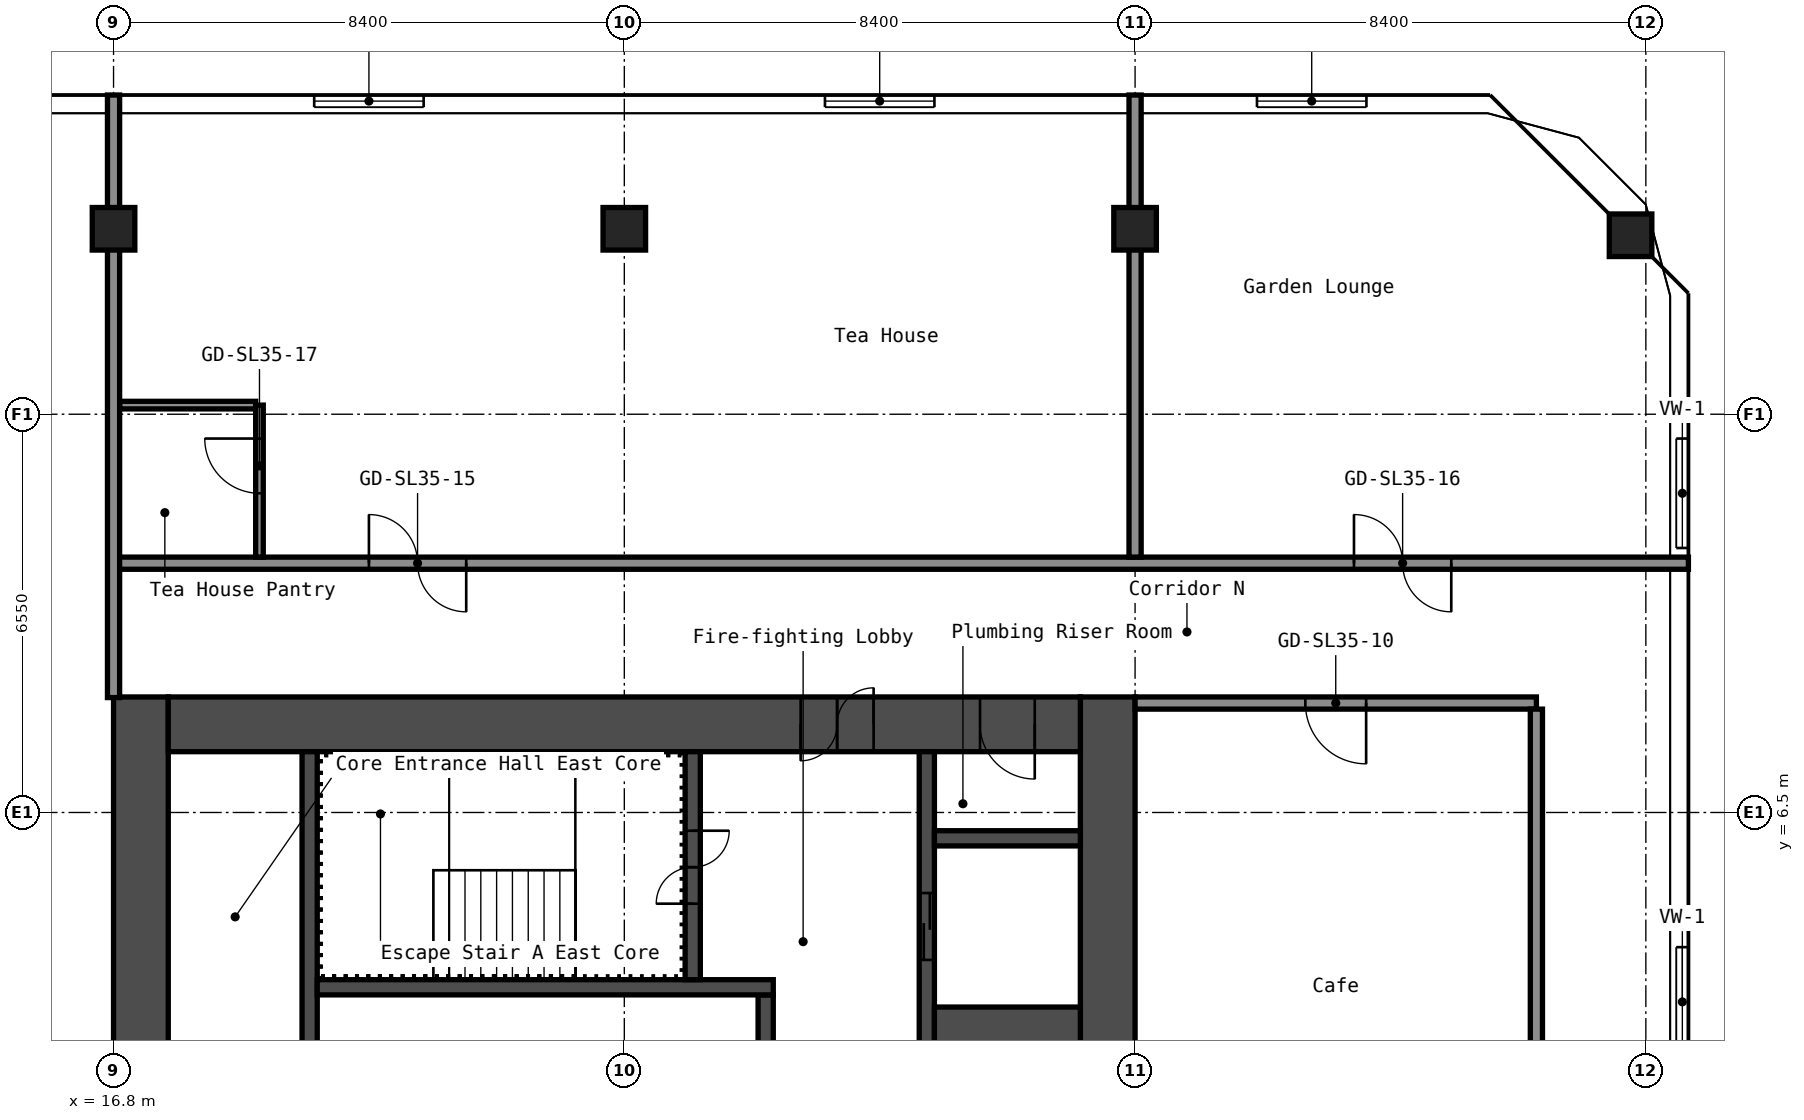
"""IFC4 building model, lengths in metres.
Left out: names, types, materials, properties, quantities, classifications, styles, units other than length and angle.
Written with IfcOpenShell. Run it as: python <this file> out.ifc"""

import sys

from ifc_helpers import new_model, si_unit, direction, frame, frame_2d, origin, origin_2d, place, context, subcontext, project, spatial, rectangle, hollow_rectangle, extrude, element, fill, save


model = new_model("IFC4")
c1 = context("Model", 3, precision=1e-05, world=origin(), true_north=direction((0.0, 1.0)))
c2 = subcontext(c1, "Body", "Model", "MODEL_VIEW")
j1 = project(units=[si_unit("LENGTHUNIT", "METRE"), si_unit("PLANEANGLEUNIT", "RADIAN")], contexts=[c1])
p1 = place(None, origin())
s1 = spatial("IfcSite", under=j1, at=p1, CompositionType="ELEMENT")
p2 = place(p1, origin())
s2 = spatial("IfcBuilding", under=s1, at=p2, CompositionType="ELEMENT")
p3 = place(p2, frame((0.0, 0.0, 124.6)))
s3 = spatial("IfcBuildingStorey", under=s2, at=p3, CompositionType="ELEMENT", Elevation=124.6)
for number, where, z_axis, x_axis in (
    (1, (16.8, 16.1, 0.0), (0.0, 0.0, 1.0), (1.0, 0.0, 0.0)),
    (2, (25.2, 16.1, 0.0), (0.0, 0.0, 1.0), (1.0, 0.0, 0.0)),
    (3, (33.6, 16.1, 0.0), (0.0, 0.0, 1.0), (1.0, 0.0, 0.0)),
    (4, (41.749, 15.994, 0.0), (0.0, 0.0, 1.0), (1.0, 0.0, 0.0)),
):
    element("IfcColumn", number, at=place(p3, frame(where, z_axis=z_axis, x_axis=x_axis)), inside=s3, PredefinedType="COLUMN", context=c2, shape_type="SweptSolid", body=[
        extrude(hollow_rectangle(XDim=0.7, YDim=0.7, WallThickness=0.028, at=origin_2d()), origin(), (0.0, 0.0, 1.0), 5.95),
    ])
p4 = place(p3, frame((17.25, -8.4, 0.0), z_axis=(0.0, 0.0, 1.0), x_axis=(0.0, 1.0, 0.0)))
e5 = element("IfcWall", 5, at=p4, inside=s3, PredefinedType="SHEAR", context=c2, shape_type="SweptSolid", body=[
    extrude(rectangle(XDim=16.8, YDim=0.9, at=frame_2d((8.4, 0.0))), origin(), (0.0, 0.0, 1.0), 5.95),
])
p5 = place(p4, frame((7.1, 0.0, 0.0)))
e6 = element("IfcOpeningElement", 6, at=p5, cuts=e5, PredefinedType="OPENING", context=c2, shape_type="SweptSolid", body=[
    extrude(rectangle(XDim=1.6, YDim=2.1, at=frame_2d((0.8, 1.05))), frame((0.0, 0.46, 0.0), z_axis=(0.0, -1.0, 0.0), x_axis=(1.0, 0.0, 0.0)), (0.0, 0.0, 1.0), 0.92),
])
p6 = place(p3, frame((33.15, -8.4, 0.0), z_axis=(0.0, 0.0, 1.0), x_axis=(0.0, 1.0, 0.0)))
e7 = element("IfcWall", 7, at=p6, inside=s3, PredefinedType="SHEAR", context=c2, shape_type="SweptSolid", body=[
    extrude(rectangle(XDim=16.8, YDim=0.9, at=frame_2d((8.4, 0.0))), origin(), (0.0, 0.0, 1.0), 5.95),
])
p7 = place(p3, frame((17.7, 7.95, 0.0), z_axis=(0.0, 0.0, 1.0), x_axis=(1.0, 0.0, 0.0)))
e8 = element("IfcWall", 8, at=p7, inside=s3, PredefinedType="SHEAR", context=c2, shape_type="SweptSolid", body=[
    extrude(rectangle(XDim=15.0, YDim=0.9, at=frame_2d((7.5, 0.0))), origin(), (0.0, 0.0, 1.0), 5.95),
])
p8 = place(p7, frame((10.4, 0.0, 0.0)))
e9 = element("IfcOpeningElement", 9, at=p8, cuts=e8, PredefinedType="OPENING", context=c2, shape_type="SweptSolid", body=[
    extrude(rectangle(XDim=1.2, YDim=2.1, at=frame_2d((0.6, 1.05))), frame((0.0, 0.46, 0.0), z_axis=(0.0, -1.0, 0.0), x_axis=(1.0, 0.0, 0.0)), (0.0, 0.0, 1.0), 0.92),
])
p9 = place(p7, frame((13.35, 0.0, 0.0)))
e10 = element("IfcOpeningElement", 10, at=p9, cuts=e8, PredefinedType="OPENING", context=c2, shape_type="SweptSolid", body=[
    extrude(rectangle(XDim=0.9, YDim=2.1, at=frame_2d((0.45, 1.05))), frame((0.0, 0.46, 0.0), z_axis=(0.0, -1.0, 0.0), x_axis=(1.0, 0.0, 0.0)), (0.0, 0.0, 1.0), 0.92),
])
p10 = place(p3, frame((20.025, 1.2, 0.0), z_axis=(0.0, 0.0, 1.0), x_axis=(0.0, 1.0, 0.0)))
e11 = element("IfcWall", 11, at=p10, inside=s3, PredefinedType="SHEAR", context=c2, shape_type="SweptSolid", body=[
    extrude(rectangle(XDim=6.3, YDim=0.25, at=frame_2d((3.15, 0.0))), origin(), (0.0, 0.0, 1.0), 5.95),
])
p11 = place(p3, frame((27.525, 1.45, 0.0), z_axis=(0.0, 0.0, 1.0), x_axis=(0.0, 1.0, 0.0)))
e12 = element("IfcWall", 12, at=p11, inside=s3, PredefinedType="SHEAR", context=c2, shape_type="SweptSolid", body=[
    extrude(rectangle(XDim=2.05, YDim=0.25, at=frame_2d((1.025, 0.0))), origin(), (0.0, 0.0, 1.0), 5.95),
])
p12 = place(p3, frame((20.15, 3.625, 0.0), z_axis=(0.0, 0.0, 1.0), x_axis=(1.0, 0.0, 0.0)))
e13 = element("IfcWall", 13, at=p12, inside=s3, PredefinedType="SHEAR", context=c2, shape_type="SweptSolid", body=[
    extrude(rectangle(XDim=7.5, YDim=0.25, at=frame_2d((3.75, 0.0))), origin(), (0.0, 0.0, 1.0), 5.95),
])
p13 = place(p3, frame((26.325, 3.75, 0.0), z_axis=(0.0, 0.0, 1.0), x_axis=(0.0, 1.0, 0.0)))
e14 = element("IfcWall", 14, at=p13, inside=s3, PredefinedType="SHEAR", context=c2, shape_type="SweptSolid", body=[
    extrude(rectangle(XDim=3.75, YDim=0.25, at=frame_2d((1.875, 0.0))), origin(), (0.0, 0.0, 1.0), 5.95),
])
p14 = place(p13, frame((1.25, 0.0, 0.0)))
e15 = element("IfcOpeningElement", 15, at=p14, cuts=e14, PredefinedType="OPENING", context=c2, shape_type="SweptSolid", body=[
    extrude(rectangle(XDim=1.2, YDim=2.1, at=frame_2d((0.6, 1.05))), frame((0.0, 0.135, 0.0), z_axis=(0.0, -1.0, 0.0), x_axis=(1.0, 0.0, 0.0)), (0.0, 0.0, 1.0), 0.27),
])
p15 = place(p3, frame((30.175, 1.45, 0.0), z_axis=(0.0, 0.0, 1.0), x_axis=(0.0, 1.0, 0.0)))
e16 = element("IfcWall", 16, at=p15, inside=s3, PredefinedType="SHEAR", context=c2, shape_type="SweptSolid", body=[
    extrude(rectangle(XDim=6.05, YDim=0.25, at=frame_2d((3.025, 0.0))), origin(), (0.0, 0.0, 1.0), 5.95),
])
p16 = place(p15, frame((2.625, 0.0, 0.0)))
e17 = element("IfcOpeningElement", 17, at=p16, cuts=e16, PredefinedType="OPENING", context=c2, shape_type="SweptSolid", body=[
    extrude(rectangle(XDim=1.1, YDim=2.1, at=frame_2d((0.55, 1.05))), frame((0.0, 0.135, 0.0), z_axis=(0.0, -1.0, 0.0), x_axis=(1.0, 0.0, 0.0)), (0.0, 0.0, 1.0), 0.27),
])
p17 = place(p3, frame((30.3, 2.375, 0.0), z_axis=(0.0, 0.0, 1.0), x_axis=(1.0, 0.0, 0.0)))
e18 = element("IfcWall", 18, at=p17, inside=s3, PredefinedType="SHEAR", context=c2, shape_type="SweptSolid", body=[
    extrude(rectangle(XDim=2.4, YDim=1.85, at=frame_2d((1.2, 0.0))), origin(), (0.0, 0.0, 1.0), 5.95),
])
p18 = place(p3, frame((30.3, 6.075, 0.0), z_axis=(0.0, 0.0, 1.0), x_axis=(1.0, 0.0, 0.0)))
e19 = element("IfcWall", 19, at=p18, inside=s3, PredefinedType="SHEAR", context=c2, shape_type="SweptSolid", body=[
    extrude(rectangle(XDim=2.4, YDim=0.25, at=frame_2d((1.2, 0.0))), origin(), (0.0, 0.0, 1.0), 5.95),
])
p19 = place(p3, frame((33.6, 8.3, 0.0), z_axis=(0.0, 0.0, 1.0), x_axis=(1.0, 0.0, 0.0)))
e20 = element("IfcWall", 20, at=p19, inside=s3, PredefinedType="PARTITIONING", context=c2, shape_type="SweptSolid", body=[
    extrude(rectangle(XDim=6.6, YDim=0.2, at=frame_2d((3.3, 0.0))), origin(), (0.0, 0.0, 1.0), 5.95),
])
p20 = place(p19, frame((2.8, 0.0, 0.0)))
e21 = element("IfcOpeningElement", 21, at=p20, cuts=e20, PredefinedType="OPENING", context=c2, shape_type="SweptSolid", body=[
    extrude(rectangle(XDim=1.0, YDim=2.1, at=frame_2d((0.5, 1.05))), frame((0.0, 0.11, 0.0), z_axis=(0.0, -1.0, 0.0), x_axis=(1.0, 0.0, 0.0)), (0.0, 0.0, 1.0), 0.22),
])
p21 = place(p3, frame((16.8, 10.6, 0.0), z_axis=(0.0, 0.0, 1.0), x_axis=(1.0, 0.0, 0.0)))
e22 = element("IfcWall", 22, at=p21, inside=s3, PredefinedType="PARTITIONING", context=c2, shape_type="SweptSolid", body=[
    extrude(rectangle(XDim=25.9, YDim=0.2, at=frame_2d((12.95, 0.0))), origin(), (0.0, 0.0, 1.0), 5.95),
])
p22 = place(p21, frame((4.2, 0.0, 0.0)))
e23 = element("IfcOpeningElement", 23, at=p22, cuts=e22, PredefinedType="OPENING", context=c2, shape_type="SweptSolid", body=[
    extrude(rectangle(XDim=1.6, YDim=2.1, at=frame_2d((0.8, 1.05))), frame((0.0, 0.11, 0.0), z_axis=(0.0, -1.0, 0.0), x_axis=(1.0, 0.0, 0.0)), (0.0, 0.0, 1.0), 0.22),
])
p23 = place(p21, frame((20.4, 0.0, 0.0)))
e24 = element("IfcOpeningElement", 24, at=p23, cuts=e22, PredefinedType="OPENING", context=c2, shape_type="SweptSolid", body=[
    extrude(rectangle(XDim=1.6, YDim=2.1, at=frame_2d((0.8, 1.05))), frame((0.0, 0.11, 0.0), z_axis=(0.0, -1.0, 0.0), x_axis=(1.0, 0.0, 0.0)), (0.0, 0.0, 1.0), 0.22),
])
p24 = place(p3, frame((16.9, 13.2, 0.0), z_axis=(0.0, 0.0, 1.0), x_axis=(1.0, 0.0, 0.0)))
e25 = element("IfcWall", 25, at=p24, inside=s3, PredefinedType="PARTITIONING", context=c2, shape_type="SweptSolid", body=[
    extrude(rectangle(XDim=2.238, YDim=0.125, at=frame_2d((1.119, 0.0))), origin(), (0.0, 0.0, 1.0), 5.95),
])
p25 = place(p3, frame((16.8, 8.39, 0.0), z_axis=(0.0, 0.0, 1.0), x_axis=(0.0, 1.0, 0.0)))
e26 = element("IfcWall", 26, at=p25, inside=s3, PredefinedType="PARTITIONING", context=c2, shape_type="SweptSolid", body=[
    extrude(rectangle(XDim=9.91, YDim=0.2, at=frame_2d((4.955, 0.0))), origin(), (0.0, 0.0, 1.0), 5.95),
])
p26 = place(p3, frame((19.2, 10.7, 0.0), z_axis=(0.0, 0.0, 1.0), x_axis=(0.0, 1.0, 0.0)))
e27 = element("IfcWall", 27, at=p26, inside=s3, PredefinedType="PARTITIONING", context=c2, shape_type="SweptSolid", body=[
    extrude(rectangle(XDim=2.5, YDim=0.125, at=frame_2d((1.25, 0.0))), origin(), (0.0, 0.0, 1.0), 5.95),
])
p27 = place(p26, frame((1.05, 0.0, 0.0)))
e28 = element("IfcOpeningElement", 28, at=p27, cuts=e27, PredefinedType="OPENING", context=c2, shape_type="SweptSolid", body=[
    extrude(rectangle(XDim=0.9, YDim=2.1, at=frame_2d((0.45, 1.05))), frame((0.0, 0.073, 0.0), z_axis=(0.0, -1.0, 0.0), x_axis=(1.0, 0.0, 0.0)), (0.0, 0.0, 1.0), 0.145),
])
p28 = place(p3, frame((33.6, 10.7, 0.0), z_axis=(0.0, 0.0, 1.0), x_axis=(0.0, 1.0, 0.0)))
e29 = element("IfcWall", 29, at=p28, inside=s3, PredefinedType="PARTITIONING", context=c2, shape_type="SweptSolid", body=[
    extrude(rectangle(XDim=7.6, YDim=0.2, at=frame_2d((3.8, 0.0))), origin(), (0.0, 0.0, 1.0), 5.95),
])
p29 = place(p3, frame((40.2, -8.2, 0.0), z_axis=(0.0, 0.0, 1.0), x_axis=(0.0, 1.0, 0.0)))
e30 = element("IfcWall", 30, at=p29, inside=s3, PredefinedType="PARTITIONING", context=c2, shape_type="SweptSolid", body=[
    extrude(rectangle(XDim=16.4, YDim=0.2, at=frame_2d((8.2, 0.0))), origin(), (0.0, 0.0, 1.0), 5.95),
])
p30 = place(p3, frame((42.6, -0.5, 4.45), z_axis=(0.0, 0.0, 1.0), x_axis=(0.0, 1.0, 0.0)))
p31 = place(p30, frame((2.985, 0.0, 0.25)))
p32 = place(p31, origin())
e31 = element("IfcWindow", 31, at=p32, inside=s3, PartitioningType="SINGLE_PANEL", PredefinedType="WINDOW", context=c2, shape_type="SweptSolid", body=[
    extrude(rectangle(XDim=1.8, YDim=0.9, at=frame_2d((0.9, 0.45))), frame((0.0, 0.03, 0.0), z_axis=(0.0, -1.0, 0.0), x_axis=(1.0, 0.0, 0.0)), (0.0, 0.0, 1.0), 0.06),
])
p33 = place(p3, frame((42.6, 7.27, 4.45), z_axis=(0.0, 0.0, 1.0), x_axis=(0.0, 1.0, 0.0)))
p34 = place(p33, frame((3.58, 0.0, 0.25)))
p35 = place(p34, origin())
e32 = element("IfcWindow", 32, at=p35, inside=s3, PartitioningType="SINGLE_PANEL", PredefinedType="WINDOW", context=c2, shape_type="SweptSolid", body=[
    extrude(rectangle(XDim=1.8, YDim=0.9, at=frame_2d((0.9, 0.45))), frame((0.0, 0.03, 0.0), z_axis=(0.0, -1.0, 0.0), x_axis=(1.0, 0.0, 0.0)), (0.0, 0.0, 1.0), 0.06),
])
p36 = place(p3, frame((39.409, 18.2, 4.45), z_axis=(0.0, 0.0, 1.0), x_axis=(-1.0, 0.0, 0.0)))
p37 = place(p36, frame((2.005, 0.0, 0.25)))
p38 = place(p37, origin())
e33 = element("IfcWindow", 33, at=p38, inside=s3, PartitioningType="SINGLE_PANEL", PredefinedType="WINDOW", context=c2, shape_type="SweptSolid", body=[
    extrude(rectangle(XDim=1.8, YDim=0.9, at=frame_2d((0.9, 0.45))), frame((0.0, 0.03, 0.0), z_axis=(0.0, -1.0, 0.0), x_axis=(1.0, 0.0, 0.0)), (0.0, 0.0, 1.0), 0.06),
])
p39 = place(p3, frame((33.6, 18.2, 4.45), z_axis=(0.0, 0.0, 1.0), x_axis=(-1.0, 0.0, 0.0)))
p40 = place(p39, frame((3.3, 0.0, 0.25)))
p41 = place(p40, origin())
e34 = element("IfcWindow", 34, at=p41, inside=s3, PartitioningType="SINGLE_PANEL", PredefinedType="WINDOW", context=c2, shape_type="SweptSolid", body=[
    extrude(rectangle(XDim=1.8, YDim=0.9, at=frame_2d((0.9, 0.45))), frame((0.0, 0.03, 0.0), z_axis=(0.0, -1.0, 0.0), x_axis=(1.0, 0.0, 0.0)), (0.0, 0.0, 1.0), 0.06),
])
p42 = place(p3, frame((25.2, 18.2, 4.45), z_axis=(0.0, 0.0, 1.0), x_axis=(-1.0, 0.0, 0.0)))
p43 = place(p42, frame((3.3, 0.0, 0.25)))
p44 = place(p43, origin())
e35 = element("IfcWindow", 35, at=p44, inside=s3, PartitioningType="SINGLE_PANEL", PredefinedType="WINDOW", context=c2, shape_type="SweptSolid", body=[
    extrude(rectangle(XDim=1.8, YDim=0.9, at=frame_2d((0.9, 0.45))), frame((0.0, 0.03, 0.0), z_axis=(0.0, -1.0, 0.0), x_axis=(1.0, 0.0, 0.0)), (0.0, 0.0, 1.0), 0.06),
])
p45 = place(p8, origin())
e36 = element("IfcDoor", 36, at=p45, inside=s3, OperationType="DOUBLE_DOOR_SINGLE_SWING", PredefinedType="DOOR", context=c2, shape_type="SweptSolid", body=[
    extrude(rectangle(XDim=1.2, YDim=2.1, at=frame_2d((0.6, 1.05))), frame((0.0, 0.025, 0.0), z_axis=(0.0, -1.0, 0.0), x_axis=(1.0, 0.0, 0.0)), (0.0, 0.0, 1.0), 0.05),
])
fill(e9, e36)
p46 = place(p9, origin())
e37 = element("IfcDoor", 37, at=p46, inside=s3, OperationType="SINGLE_SWING_RIGHT", PredefinedType="DOOR", context=c2, shape_type="SweptSolid", body=[
    extrude(rectangle(XDim=0.9, YDim=2.1, at=frame_2d((0.45, 1.05))), frame((0.0, 0.025, 0.0), z_axis=(0.0, -1.0, 0.0), x_axis=(1.0, 0.0, 0.0)), (0.0, 0.0, 1.0), 0.05),
])
fill(e10, e37)
p47 = place(p14, origin())
e38 = element("IfcDoor", 38, at=p47, inside=s3, OperationType="DOUBLE_DOOR_SINGLE_SWING", PredefinedType="DOOR", context=c2, shape_type="SweptSolid", body=[
    extrude(rectangle(XDim=1.2, YDim=2.1, at=frame_2d((0.6, 1.05))), frame((0.0, 0.025, 0.0), z_axis=(0.0, -1.0, 0.0), x_axis=(1.0, 0.0, 0.0)), (0.0, 0.0, 1.0), 0.05),
])
fill(e15, e38)
p48 = place(p16, origin())
e39 = element("IfcDoor", 39, at=p48, inside=s3, OperationType="DOUBLE_DOOR_SLIDING", PredefinedType="DOOR", context=c2, shape_type="SweptSolid", body=[
    extrude(rectangle(XDim=1.1, YDim=2.1, at=frame_2d((0.55, 1.05))), frame((0.0, 0.025, 0.0), z_axis=(0.0, -1.0, 0.0), x_axis=(1.0, 0.0, 0.0)), (0.0, 0.0, 1.0), 0.05),
])
fill(e17, e39)
p49 = place(p20, origin())
e40 = element("IfcDoor", 40, at=p49, inside=s3, OperationType="SINGLE_SWING_RIGHT", PredefinedType="DOOR", context=c2, shape_type="SweptSolid", body=[
    extrude(rectangle(XDim=1.0, YDim=2.1, at=frame_2d((0.5, 1.05))), frame((0.0, 0.025, 0.0), z_axis=(0.0, -1.0, 0.0), x_axis=(1.0, 0.0, 0.0)), (0.0, 0.0, 1.0), 0.05),
])
fill(e21, e40)
p50 = place(p22, origin())
e41 = element("IfcDoor", 41, at=p50, inside=s3, OperationType="DOUBLE_DOOR_SINGLE_SWING", PredefinedType="DOOR", context=c2, shape_type="SweptSolid", body=[
    extrude(rectangle(XDim=1.6, YDim=2.1, at=frame_2d((0.8, 1.05))), frame((0.0, 0.025, 0.0), z_axis=(0.0, -1.0, 0.0), x_axis=(1.0, 0.0, 0.0)), (0.0, 0.0, 1.0), 0.05),
])
fill(e23, e41)
p51 = place(p23, origin())
e42 = element("IfcDoor", 42, at=p51, inside=s3, OperationType="DOUBLE_DOOR_SINGLE_SWING", PredefinedType="DOOR", context=c2, shape_type="SweptSolid", body=[
    extrude(rectangle(XDim=1.6, YDim=2.1, at=frame_2d((0.8, 1.05))), frame((0.0, 0.025, 0.0), z_axis=(0.0, -1.0, 0.0), x_axis=(1.0, 0.0, 0.0)), (0.0, 0.0, 1.0), 0.05),
])
fill(e24, e42)
p52 = place(p27, origin())
e43 = element("IfcDoor", 43, at=p52, inside=s3, OperationType="SINGLE_SWING_LEFT", PredefinedType="DOOR", context=c2, shape_type="SweptSolid", body=[
    extrude(rectangle(XDim=0.9, YDim=2.1, at=frame_2d((0.45, 1.05))), frame((0.0, 0.025, 0.0), z_axis=(0.0, -1.0, 0.0), x_axis=(1.0, 0.0, 0.0)), (0.0, 0.0, 1.0), 0.05),
])
fill(e28, e43)
save(model, sys.argv[1])
